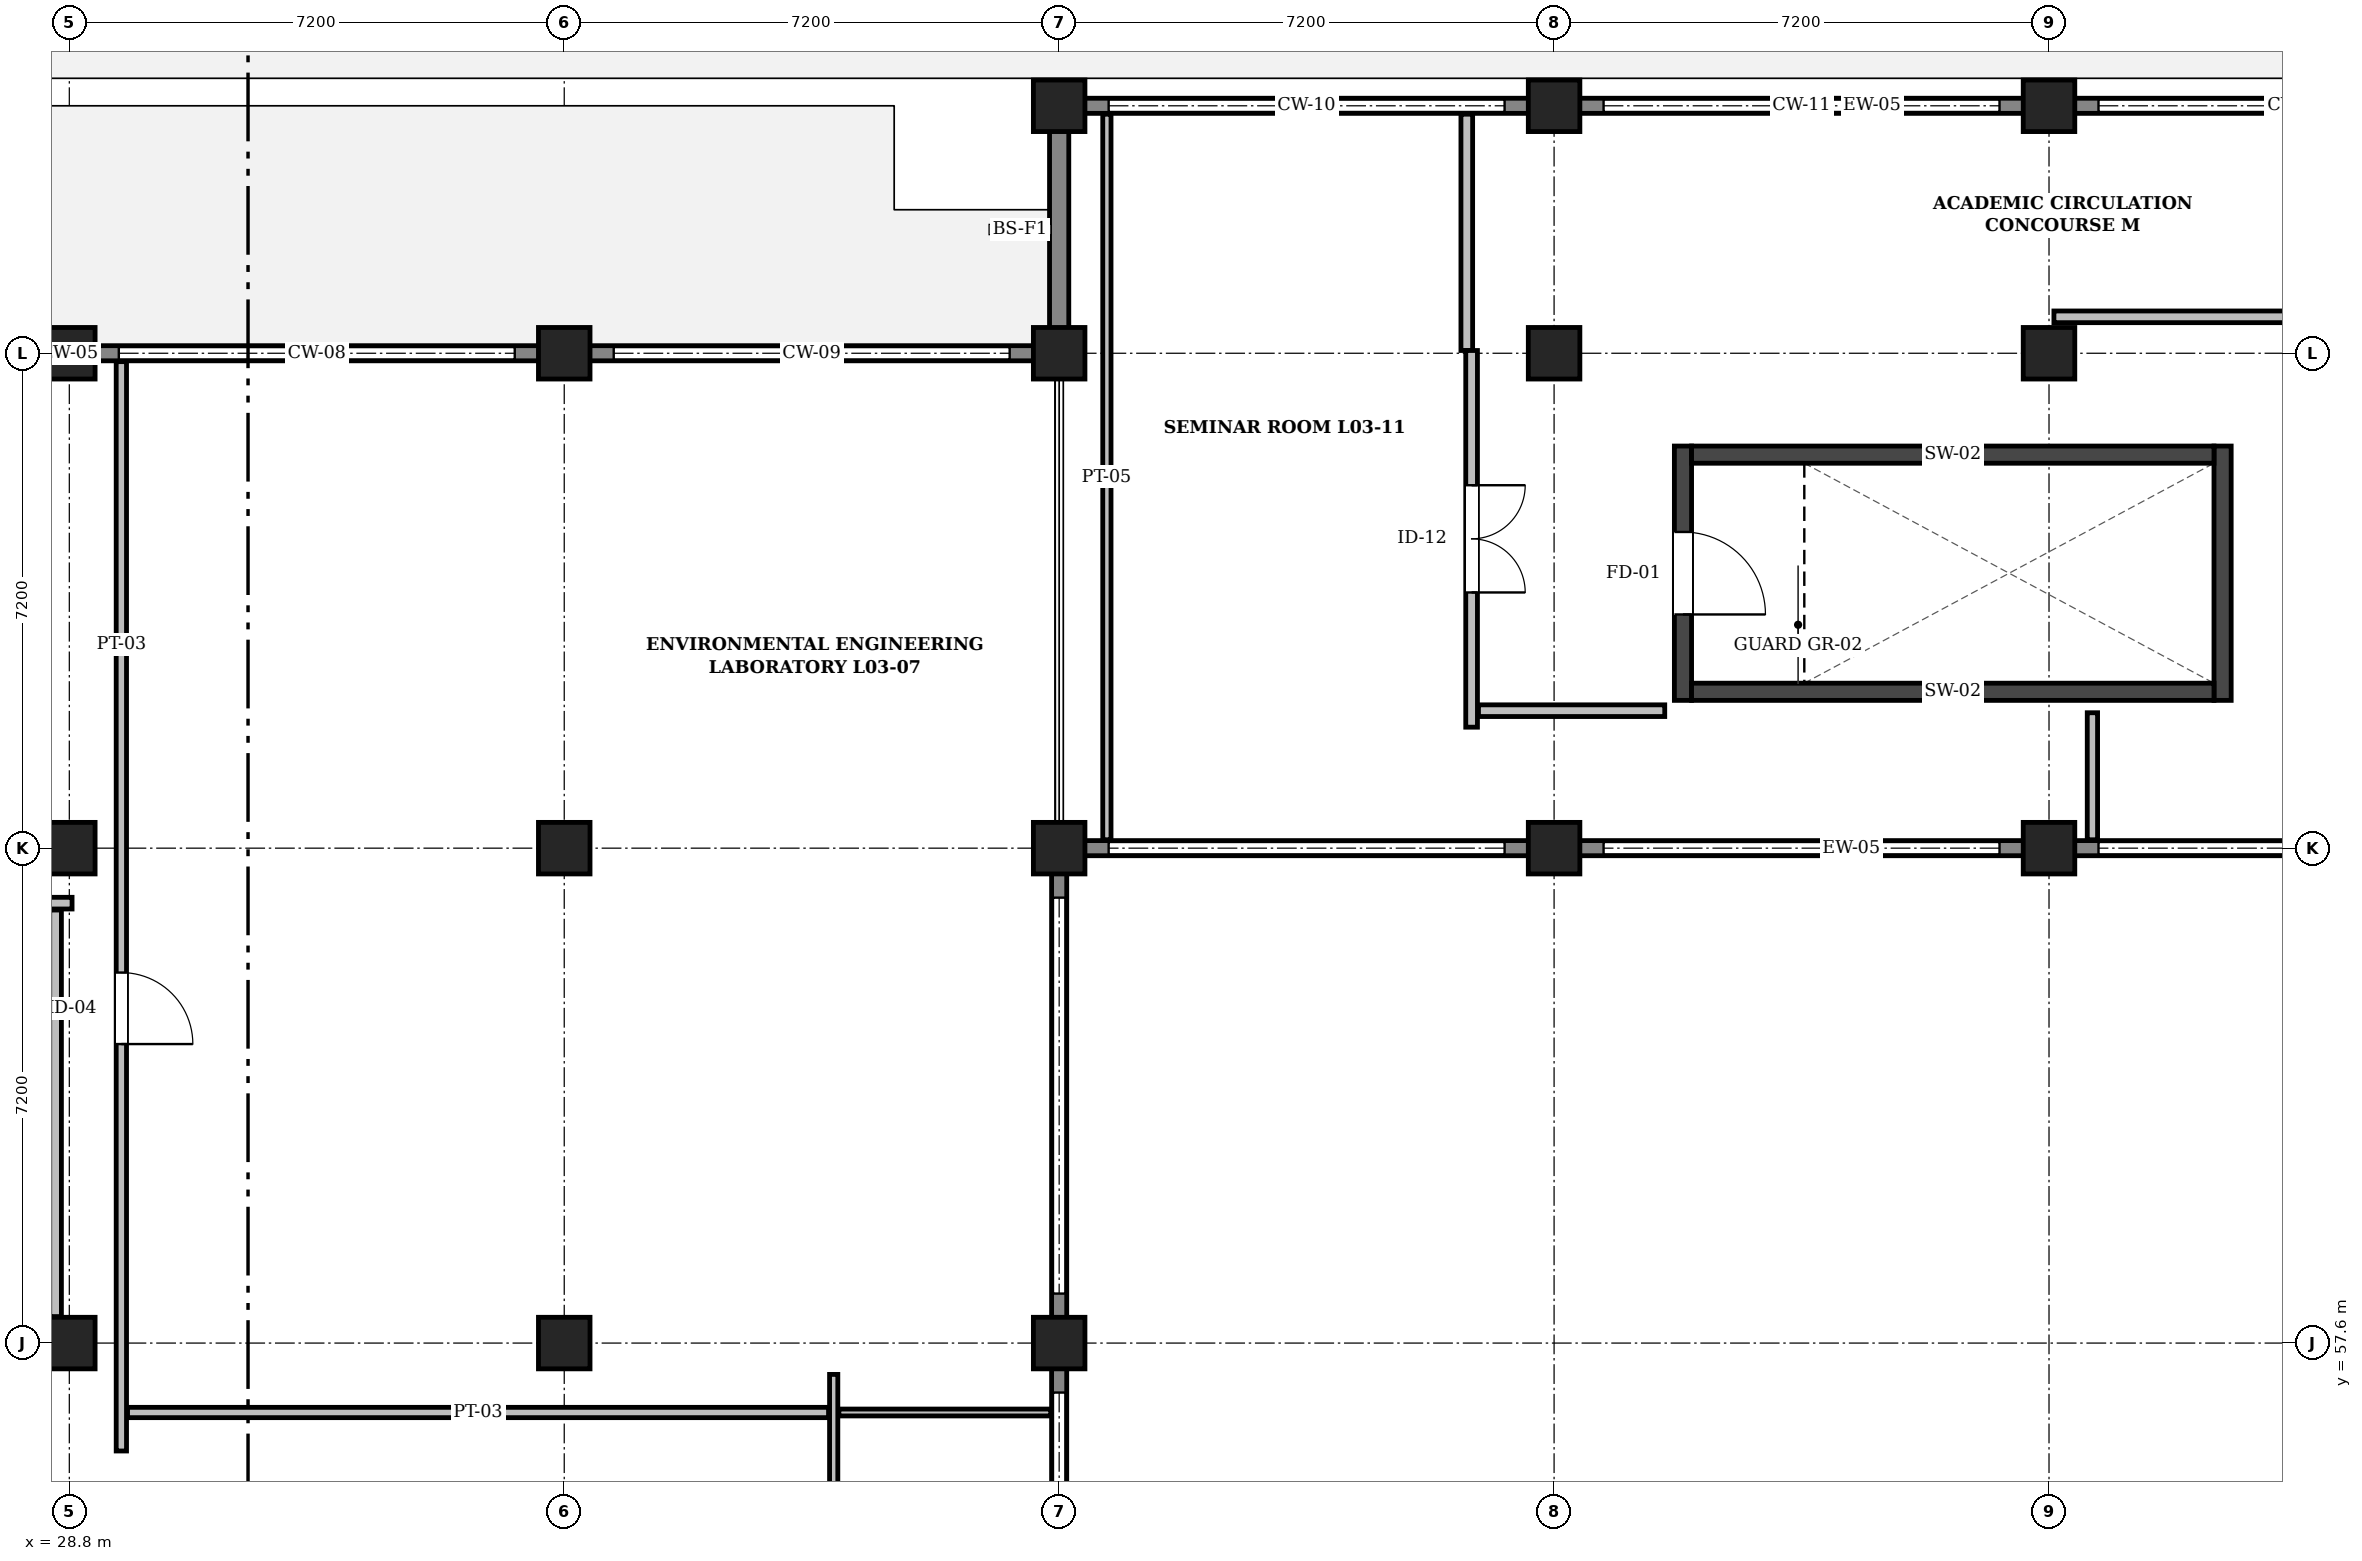
"""IFC4 building model, lengths in metres.
Left out: names, types, materials, properties, quantities, classifications, styles, units other than length and angle.
Written with IfcOpenShell. Run it as: python <this file> out.ifc"""

import sys

from ifc_helpers import new_model, si_unit, direction, frame, frame_2d, origin, origin_2d, place, context, subcontext, project, spatial, rectangle, extrude, element, fill, save


model = new_model("IFC4")
c1 = context("Model", 3, precision=1e-05, world=origin(), true_north=direction((0.0, 1.0)))
c2 = subcontext(c1, "Body", "Model", "MODEL_VIEW")
j1 = project(units=[si_unit("LENGTHUNIT", "METRE"), si_unit("PLANEANGLEUNIT", "RADIAN")], contexts=[c1])
p1 = place(None, origin())
s1 = spatial("IfcSite", under=j1, at=p1, CompositionType="ELEMENT")
p2 = place(p1, origin())
s2 = spatial("IfcBuilding", under=s1, at=p2, CompositionType="ELEMENT")
p3 = place(p2, frame((0.0, 0.0, 14.4)))
s3 = spatial("IfcBuildingStorey", under=s2, at=p3, CompositionType="ELEMENT", Elevation=14.4)
for number, where, z_axis, x_axis in (
    (1, (28.8, 57.6, 0.0), (0.0, 0.0, 1.0), (1.0, 0.0, 0.0)),
    (2, (28.8, 64.8, 0.0), (0.0, 0.0, 1.0), (1.0, 0.0, 0.0)),
    (3, (28.8, 72.0, 0.0), (0.0, 0.0, 1.0), (1.0, 0.0, 0.0)),
    (4, (36.0, 57.6, 0.0), (0.0, 0.0, 1.0), (1.0, 0.0, 0.0)),
    (5, (36.0, 64.8, 0.0), (0.0, 0.0, 1.0), (1.0, 0.0, 0.0)),
    (6, (36.0, 72.0, 0.0), (0.0, 0.0, 1.0), (1.0, 0.0, 0.0)),
    (7, (43.2, 57.6, 0.0), (0.0, 0.0, 1.0), (1.0, 0.0, 0.0)),
    (8, (43.2, 64.8, 0.0), (0.0, 0.0, 1.0), (1.0, 0.0, 0.0)),
    (9, (43.2, 72.0, 0.0), (0.0, 0.0, 1.0), (1.0, 0.0, 0.0)),
    (10, (43.2, 75.6, 0.0), (0.0, 0.0, 1.0), (1.0, 0.0, 0.0)),
    (11, (50.4, 64.8, 0.0), (0.0, 0.0, 1.0), (1.0, 0.0, 0.0)),
    (12, (50.4, 72.0, 0.0), (0.0, 0.0, 1.0), (1.0, 0.0, 0.0)),
    (13, (50.4, 75.6, 0.0), (0.0, 0.0, 1.0), (1.0, 0.0, 0.0)),
    (14, (57.6, 64.8, 0.0), (0.0, 0.0, 1.0), (1.0, 0.0, 0.0)),
    (15, (57.6, 72.0, 0.0), (0.0, 0.0, 1.0), (1.0, 0.0, 0.0)),
    (16, (57.6, 75.6, 0.0), (0.0, 0.0, 1.0), (1.0, 0.0, 0.0)),
):
    element("IfcColumn", number, at=place(p3, frame(where, z_axis=z_axis, x_axis=x_axis)), inside=s3, PredefinedType="COLUMN", context=c2, shape_type="SweptSolid", body=[
        extrude(rectangle(XDim=0.75, YDim=0.75, at=origin_2d()), origin(), (0.0, 0.0, 1.0), 4.5),
    ])
for number, where, z_axis, x_axis in (
    (17, (21.6, 72.0, 0.0), (0.0, 0.0, 1.0), (1.0, 0.0, 0.0)),
    (18, (28.8, 72.0, 0.0), (0.0, 0.0, 1.0), (1.0, 0.0, 0.0)),
):
    element("IfcWall", number, at=place(p3, frame(where, z_axis=z_axis, x_axis=x_axis)), inside=s3, PredefinedType="SOLIDWALL", context=c2, shape_type="SweptSolid", body=[
        extrude(rectangle(XDim=7.2, YDim=0.22, at=frame_2d((3.6, 0.0))), origin(), (0.0, 0.0, 1.0), 1.24),
    ])
p4 = place(p3, frame((36.0, 72.0, 0.0), z_axis=(0.0, 0.0, 1.0), x_axis=(1.0, 0.0, 0.0)))
e19 = element("IfcWall", 19, at=p4, inside=s3, PredefinedType="SOLIDWALL", context=c2, shape_type="SweptSolid", body=[
    extrude(rectangle(XDim=7.35, YDim=0.22, at=frame_2d((3.675, 0.0))), origin(), (0.0, 0.0, 1.0), 1.24),
])
p5 = place(p3, frame((43.2, 72.152, 0.0), z_axis=(0.0, 0.0, 1.0), x_axis=(0.0, 1.0, 0.0)))
e20 = element("IfcWall", 20, at=p5, inside=s3, PredefinedType="SOLIDWALL", context=c2, shape_type="SweptSolid", body=[
    extrude(rectangle(XDim=3.296, YDim=0.28, at=frame_2d((1.648, 0.0))), origin(), (0.0, 0.0, 1.0), 4.22),
])
p6 = place(p3, frame((43.05, 75.6, 0.0), z_axis=(0.0, 0.0, 1.0), x_axis=(1.0, 0.0, 0.0)))
e21 = element("IfcWall", 21, at=p6, inside=s3, PredefinedType="SOLIDWALL", context=c2, shape_type="SweptSolid", body=[
    extrude(rectangle(XDim=7.35, YDim=0.22, at=frame_2d((3.675, 0.0))), origin(), (0.0, 0.0, 1.0), 1.24),
])
p7 = place(p3, frame((50.4, 75.6, 0.0), z_axis=(0.0, 0.0, 1.0), x_axis=(1.0, 0.0, 0.0)))
e22 = element("IfcWall", 22, at=p7, inside=s3, PredefinedType="SOLIDWALL", context=c2, shape_type="SweptSolid", body=[
    extrude(rectangle(XDim=7.2, YDim=0.22, at=frame_2d((3.6, 0.0))), origin(), (0.0, 0.0, 1.0), 1.24),
])
for number, where, z_axis, x_axis in (
    (23, (57.6, 75.6, 0.0), (0.0, 0.0, 1.0), (1.0, 0.0, 0.0)),
    (24, (64.8, 64.8, 0.0), (0.0, 0.0, 1.0), (-1.0, 0.0, 0.0)),
):
    element("IfcWall", number, at=place(p3, frame(where, z_axis=z_axis, x_axis=x_axis)), inside=s3, PredefinedType="SOLIDWALL", context=c2, shape_type="SweptSolid", body=[
        extrude(rectangle(XDim=7.2, YDim=0.22, at=frame_2d((3.6, 0.0))), origin(), (0.0, 0.0, 1.0), 1.24),
    ])
p8 = place(p3, frame((57.6, 64.8, 0.0), z_axis=(0.0, 0.0, 1.0), x_axis=(-1.0, 0.0, 0.0)))
e25 = element("IfcWall", 25, at=p8, inside=s3, PredefinedType="SOLIDWALL", context=c2, shape_type="SweptSolid", body=[
    extrude(rectangle(XDim=7.2, YDim=0.22, at=frame_2d((3.6, 0.0))), origin(), (0.0, 0.0, 1.0), 1.24),
])
p9 = place(p3, frame((50.4, 64.8, 0.0), z_axis=(0.0, 0.0, 1.0), x_axis=(-1.0, 0.0, 0.0)))
e26 = element("IfcWall", 26, at=p9, inside=s3, PredefinedType="SOLIDWALL", context=c2, shape_type="SweptSolid", body=[
    extrude(rectangle(XDim=7.35, YDim=0.22, at=frame_2d((3.675, 0.0))), origin(), (0.0, 0.0, 1.0), 1.24),
])
p10 = place(p3, frame((43.2, 64.648, 0.0), z_axis=(0.0, 0.0, 1.0), x_axis=(0.0, -1.0, 0.0)))
e27 = element("IfcWall", 27, at=p10, inside=s3, PredefinedType="SOLIDWALL", context=c2, shape_type="SweptSolid", body=[
    extrude(rectangle(XDim=7.048, YDim=0.22, at=frame_2d((3.524, 0.0))), origin(), (0.0, 0.0, 1.0), 1.24),
])
p11 = place(p3, frame((43.2, 57.6, 0.0), z_axis=(0.0, 0.0, 1.0), x_axis=(0.0, -1.0, 0.0)))
e28 = element("IfcWall", 28, at=p11, inside=s3, PredefinedType="SOLIDWALL", context=c2, shape_type="SweptSolid", body=[
    extrude(rectangle(XDim=7.2, YDim=0.22, at=frame_2d((3.6, 0.0))), origin(), (0.0, 0.0, 1.0), 1.24),
])
p12 = place(p3, frame((52.275, 66.95, 0.0), z_axis=(0.0, 0.0, 1.0), x_axis=(0.0, 1.0, 0.0)))
e29 = element("IfcWall", 29, at=p12, inside=s3, PredefinedType="SHEAR", context=c2, shape_type="SweptSolid", body=[
    extrude(rectangle(XDim=3.7, YDim=0.25, at=frame_2d((1.85, 0.0))), origin(), (0.0, 0.0, 1.0), 4.25),
])
p13 = place(p12, frame((1.25, 0.0, 0.0)))
e30 = element("IfcOpeningElement", 30, at=p13, cuts=e29, PredefinedType="OPENING", context=c2, shape_type="SweptSolid", body=[
    extrude(rectangle(XDim=1.2, YDim=2.15, at=frame_2d((0.6, 1.075))), frame((0.0, 0.137, 0.0), z_axis=(0.0, -1.0, 0.0), x_axis=(1.0, 0.0, 0.0)), (0.0, 0.0, 1.0), 0.274),
])
p14 = place(p3, frame((60.125, 66.95, 0.0), z_axis=(0.0, 0.0, 1.0), x_axis=(0.0, 1.0, 0.0)))
e31 = element("IfcWall", 31, at=p14, inside=s3, PredefinedType="SHEAR", context=c2, shape_type="SweptSolid", body=[
    extrude(rectangle(XDim=3.7, YDim=0.25, at=frame_2d((1.85, 0.0))), origin(), (0.0, 0.0, 1.0), 4.25),
])
for number, where, z_axis, x_axis in (
    (32, (52.4, 67.075, 0.0), (0.0, 0.0, 1.0), (1.0, 0.0, 0.0)),
    (33, (52.4, 70.525, 0.0), (0.0, 0.0, 1.0), (1.0, 0.0, 0.0)),
):
    element("IfcWall", number, at=place(p3, frame(where, z_axis=z_axis, x_axis=x_axis)), inside=s3, PredefinedType="SHEAR", context=c2, shape_type="SweptSolid", body=[
        extrude(rectangle(XDim=7.6, YDim=0.25, at=frame_2d((3.8, 0.0))), origin(), (0.0, 0.0, 1.0), 4.25),
    ])
p15 = place(p3, frame((49.13, 72.04, 0.0), z_axis=(0.0, 0.0, 1.0), x_axis=(0.0, 1.0, 0.0)))
e34 = element("IfcWall", 34, at=p15, inside=s3, PredefinedType="PARTITIONING", context=c2, shape_type="SweptSolid", body=[
    extrude(rectangle(XDim=3.438, YDim=0.17, at=frame_2d((1.719, 0.0))), origin(), (0.0, 0.0, 1.0), 4.16),
])
p16 = place(p3, frame((57.671, 72.53, 0.0), z_axis=(0.0, 0.0, 1.0), x_axis=(1.0, 0.0, 0.0)))
e35 = element("IfcWall", 35, at=p16, inside=s3, PredefinedType="PARTITIONING", context=c2, shape_type="SweptSolid", body=[
    extrude(rectangle(XDim=15.457, YDim=0.17, at=frame_2d((7.729, 0.0))), origin(), (0.0, 0.0, 1.0), 4.16),
])
p17 = place(p16, frame((9.049, 0.0, 0.0)))
e36 = element("IfcOpeningElement", 36, at=p17, cuts=e35, PredefinedType="OPENING", context=c2, shape_type="SweptSolid", body=[
    extrude(rectangle(XDim=1.76, YDim=2.3, at=frame_2d((0.88, 1.15))), frame((0.0, 0.097, 0.0), z_axis=(0.0, -1.0, 0.0), x_axis=(1.0, 0.0, 0.0)), (0.0, 0.0, 1.0), 0.194),
])
p18 = place(p3, frame((49.2, 66.56, 0.0), z_axis=(0.0, 0.0, 1.0), x_axis=(0.0, 1.0, 0.0)))
e37 = element("IfcWall", 37, at=p18, inside=s3, PredefinedType="PARTITIONING", context=c2, shape_type="SweptSolid", body=[
    extrude(rectangle(XDim=5.48, YDim=0.17, at=frame_2d((2.74, 0.0))), origin(), (0.0, 0.0, 1.0), 4.16),
])
p19 = place(p18, frame((1.96, 0.0, 0.0)))
e38 = element("IfcOpeningElement", 38, at=p19, cuts=e37, PredefinedType="OPENING", context=c2, shape_type="SweptSolid", body=[
    extrude(rectangle(XDim=1.56, YDim=2.26, at=frame_2d((0.78, 1.13))), frame((0.0, 0.097, 0.0), z_axis=(0.0, -1.0, 0.0), x_axis=(1.0, 0.0, 0.0)), (0.0, 0.0, 1.0), 0.194),
])
p20 = place(p3, frame((49.3, 66.8, 0.0), z_axis=(0.0, 0.0, 1.0), x_axis=(1.0, 0.0, 0.0)))
e39 = element("IfcWall", 39, at=p20, inside=s3, PredefinedType="PARTITIONING", context=c2, shape_type="SweptSolid", body=[
    extrude(rectangle(XDim=2.71, YDim=0.17, at=frame_2d((1.355, 0.0))), origin(), (0.0, 0.0, 1.0), 4.16),
])
p21 = place(p3, frame((24.56, 64.0, 0.0), z_axis=(0.0, 0.0, 1.0), x_axis=(1.0, 0.0, 0.0)))
e40 = element("IfcWall", 40, at=p21, inside=s3, PredefinedType="PARTITIONING", context=c2, shape_type="SweptSolid", body=[
    extrude(rectangle(XDim=4.28, YDim=0.17, at=frame_2d((2.14, 0.0))), origin(), (0.0, 0.0, 1.0), 4.16),
])
p22 = place(p3, frame((28.6, 57.985, 0.0), z_axis=(0.0, 0.0, 1.0), x_axis=(0.0, 1.0, 0.0)))
e41 = element("IfcWall", 41, at=p22, inside=s3, PredefinedType="PARTITIONING", context=c2, shape_type="SweptSolid", body=[
    extrude(rectangle(XDim=5.915, YDim=0.17, at=frame_2d((2.958, 0.0))), origin(), (0.0, 0.0, 1.0), 3.73),
])
p23 = place(p3, frame((29.557, 56.03, 0.0), z_axis=(0.0, 0.0, 1.0), x_axis=(0.0, 1.0, 0.0)))
e42 = element("IfcWall", 42, at=p23, inside=s3, PredefinedType="PARTITIONING", context=c2, shape_type="SweptSolid", body=[
    extrude(rectangle(XDim=15.848, YDim=0.15, at=frame_2d((7.924, 0.0))), origin(), (0.0, 0.0, 1.0), 4.16),
])
p24 = place(p23, frame((5.92, 0.0, 0.0)))
e43 = element("IfcOpeningElement", 43, at=p24, cuts=e42, PredefinedType="OPENING", context=c2, shape_type="SweptSolid", body=[
    extrude(rectangle(XDim=1.04, YDim=2.18, at=frame_2d((0.52, 1.09))), frame((0.0, 0.087, 0.0), z_axis=(0.0, -1.0, 0.0), x_axis=(1.0, 0.0, 0.0)), (0.0, 0.0, 1.0), 0.174),
])
p25 = place(p3, frame((39.92, 42.73, 0.0), z_axis=(0.0, 0.0, 1.0), x_axis=(0.0, 1.0, 0.0)))
e44 = element("IfcWall", 44, at=p25, inside=s3, PredefinedType="PARTITIONING", context=c2, shape_type="SweptSolid", body=[
    extrude(rectangle(XDim=14.414, YDim=0.12, at=frame_2d((7.207, 0.0))), origin(), (0.0, 0.0, 1.0), 4.16),
])
p26 = place(p25, frame((6.717, 0.0, 0.0)))
e45 = element("IfcOpeningElement", 45, at=p26, cuts=e44, PredefinedType="OPENING", context=c2, shape_type="SweptSolid", body=[
    extrude(rectangle(XDim=0.98, YDim=2.14, at=frame_2d((0.49, 1.07))), frame((0.0, 0.072, 0.0), z_axis=(0.0, -1.0, 0.0), x_axis=(1.0, 0.0, 0.0)), (0.0, 0.0, 1.0), 0.144),
])
p27 = place(p3, frame((39.995, 56.59, 0.0), z_axis=(0.0, 0.0, 1.0), x_axis=(1.0, 0.0, 0.0)))
e46 = element("IfcWall", 46, at=p27, inside=s3, PredefinedType="PARTITIONING", context=c2, shape_type="SweptSolid", body=[
    extrude(rectangle(XDim=3.083, YDim=0.1, at=frame_2d((1.542, 0.0))), origin(), (0.0, 0.0, 1.0), 4.16),
])
p28 = place(p3, frame((29.647, 56.59, 0.0), z_axis=(0.0, 0.0, 1.0), x_axis=(1.0, 0.0, 0.0)))
e47 = element("IfcWall", 47, at=p28, inside=s3, PredefinedType="PARTITIONING", context=c2, shape_type="SweptSolid", body=[
    extrude(rectangle(XDim=10.198, YDim=0.15, at=frame_2d((5.099, 0.0))), origin(), (0.0, 0.0, 1.0), 4.16),
])
p29 = place(p3, frame((43.894, 64.922, 0.0), z_axis=(0.0, 0.0, 1.0), x_axis=(0.0, 1.0, 0.0)))
e48 = element("IfcWall", 48, at=p29, inside=s3, PredefinedType="PARTITIONING", context=c2, shape_type="SweptSolid", body=[
    extrude(rectangle(XDim=10.556, YDim=0.12, at=frame_2d((5.278, 0.0))), origin(), (0.0, 0.0, 1.0), 4.16),
])
p30 = place(p3, frame((58.231, 64.922, 0.0), z_axis=(0.0, 0.0, 1.0), x_axis=(0.0, 1.0, 0.0)))
e49 = element("IfcWall", 49, at=p30, inside=s3, PredefinedType="PARTITIONING", context=c2, shape_type="SweptSolid", body=[
    extrude(rectangle(XDim=1.848, YDim=0.15, at=frame_2d((0.924, 0.0))), origin(), (0.0, 0.0, 1.0), 4.16),
])
p31 = place(p13, frame((1.2, 0.0, 0.0), z_axis=(0.0, 0.0, 1.0), x_axis=(-1.0, 0.0, 0.0)))
e50 = element("IfcDoor", 50, at=p31, inside=s3, OperationType="SINGLE_SWING_RIGHT", PredefinedType="DOOR", context=c2, shape_type="SweptSolid", body=[
    extrude(rectangle(XDim=1.2, YDim=2.15, at=frame_2d((0.6, 1.075))), frame((0.0, 0.025, 0.0), z_axis=(0.0, -1.0, 0.0), x_axis=(1.0, 0.0, 0.0)), (0.0, 0.0, 1.0), 0.05),
])
fill(e30, e50)
p32 = place(p19, frame((1.56, 0.0, 0.0), z_axis=(0.0, 0.0, 1.0), x_axis=(-1.0, 0.0, 0.0)))
e51 = element("IfcDoor", 51, at=p32, inside=s3, OperationType="DOUBLE_DOOR_SINGLE_SWING", PredefinedType="DOOR", context=c2, shape_type="SweptSolid", body=[
    extrude(rectangle(XDim=1.56, YDim=2.26, at=frame_2d((0.78, 1.13))), frame((0.0, 0.025, 0.0), z_axis=(0.0, -1.0, 0.0), x_axis=(1.0, 0.0, 0.0)), (0.0, 0.0, 1.0), 0.05),
])
fill(e38, e51)
p33 = place(p24, frame((1.04, 0.0, 0.0), z_axis=(0.0, 0.0, 1.0), x_axis=(-1.0, 0.0, 0.0)))
e52 = element("IfcDoor", 52, at=p33, inside=s3, OperationType="SINGLE_SWING_RIGHT", PredefinedType="DOOR", context=c2, shape_type="SweptSolid", body=[
    extrude(rectangle(XDim=1.04, YDim=2.18, at=frame_2d((0.52, 1.09))), frame((0.0, 0.025, 0.0), z_axis=(0.0, -1.0, 0.0), x_axis=(1.0, 0.0, 0.0)), (0.0, 0.0, 1.0), 0.05),
])
fill(e43, e52)
save(model, sys.argv[1])
